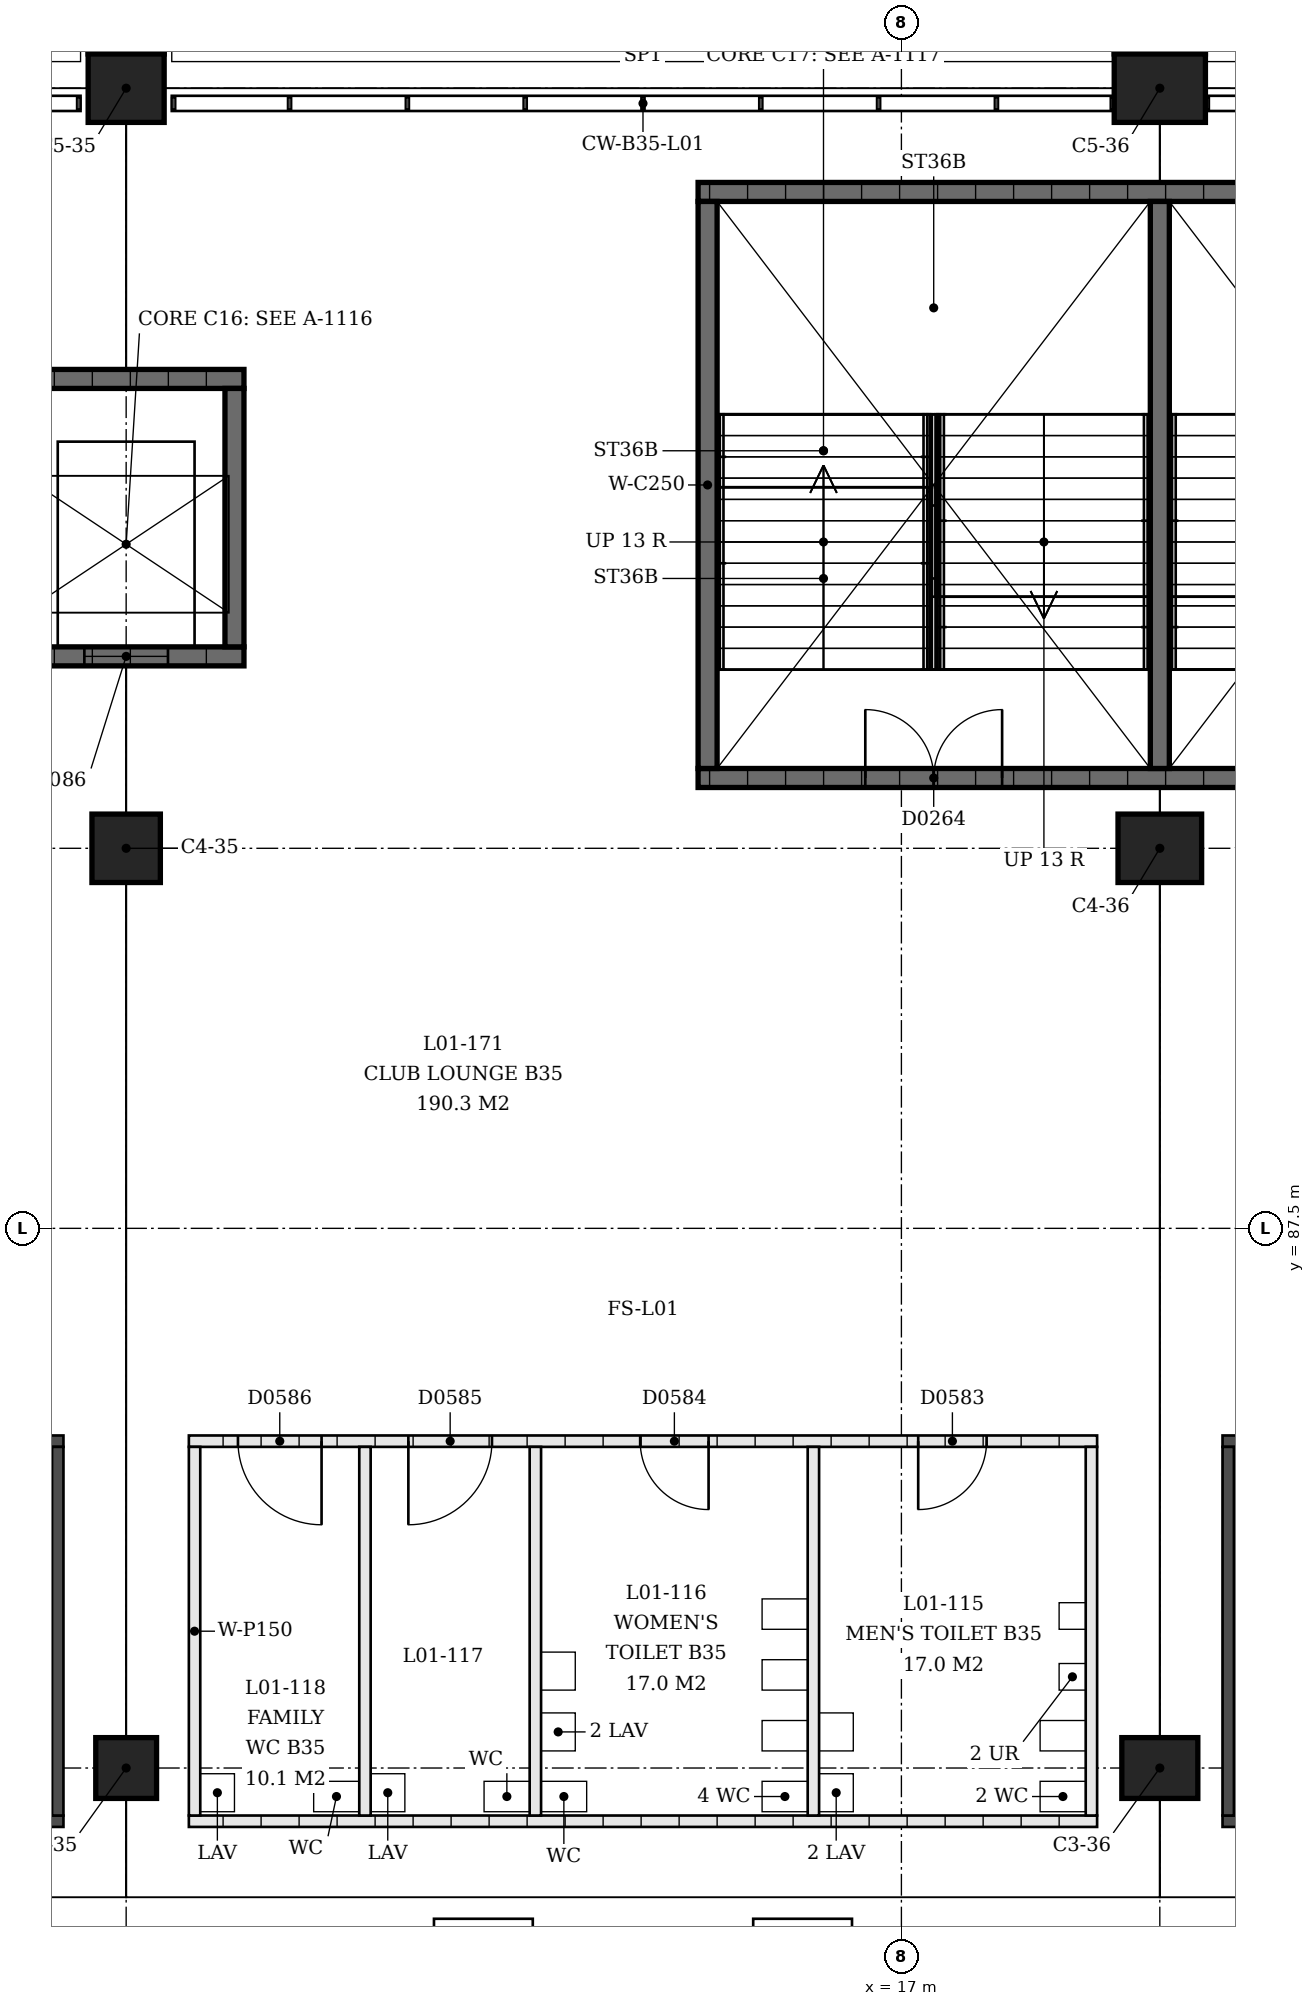
"""IFC4 building model, lengths in metres.
Left out: names, types, materials, properties, quantities, classifications, styles, units other than length and angle.
Written with IfcOpenShell. Run it as: python <this file> out.ifc"""

import sys

from ifc_helpers import new_model, si_unit, direction, frame, frame_2d, origin, origin_2d, place, context, subcontext, project, spatial, rectangle, extrude, element, fill, save


model = new_model("IFC4")
c1 = context("Model", 3, precision=1e-05, world=origin(), true_north=direction((0.0, 1.0)))
c2 = subcontext(c1, "Body", "Model", "MODEL_VIEW")
j1 = project(units=[si_unit("LENGTHUNIT", "METRE"), si_unit("PLANEANGLEUNIT", "RADIAN")], contexts=[c1])
p1 = place(None, origin())
s1 = spatial("IfcSite", under=j1, at=p1, CompositionType="ELEMENT")
p2 = place(p1, origin())
s2 = spatial("IfcBuilding", under=s1, at=p2, CompositionType="ELEMENT")
p3 = place(p2, frame((0.0, 0.0, 4.5)))
s3 = spatial("IfcBuildingStorey", under=s2, at=p3, CompositionType="ELEMENT", Elevation=4.5)
p4 = place(p3, frame((6.8, 80.4, 0.0), z_axis=(0.0, 0.0, 1.0), x_axis=(-1.0, 0.0, 0.0)))
e1 = element("IfcColumn", 1, at=p4, inside=s3, PredefinedType="COLUMN", context=c2, shape_type="SweptSolid", body=[
    extrude(rectangle(XDim=0.8, YDim=0.8, at=origin_2d()), origin(), (0.0, 0.0, 1.0), 4.5),
])
p5 = place(p3, frame((6.8, 92.5, 0.0), z_axis=(0.0, 0.0, 1.0), x_axis=(-1.0, 0.0, 0.0)))
e2 = element("IfcColumn", 2, at=p5, inside=s3, PredefinedType="COLUMN", context=c2, shape_type="SweptSolid", body=[
    extrude(rectangle(XDim=0.9, YDim=0.9, at=origin_2d()), origin(), (0.0, 0.0, 1.0), 4.5),
])
p6 = place(p3, frame((6.8, 102.5, 0.0), z_axis=(0.0, 0.0, 1.0), x_axis=(-1.0, 0.0, 0.0)))
e3 = element("IfcColumn", 3, at=p6, inside=s3, PredefinedType="COLUMN", context=c2, shape_type="SweptSolid", body=[
    extrude(rectangle(XDim=1.0, YDim=0.9, at=origin_2d()), origin(), (0.0, 0.0, 1.0), 4.5),
])
p7 = place(p3, frame((20.4, 80.4, 0.0), z_axis=(0.0, 0.0, 1.0), x_axis=(-1.0, 0.0, 0.0)))
e4 = element("IfcColumn", 4, at=p7, inside=s3, PredefinedType="COLUMN", context=c2, shape_type="SweptSolid", body=[
    extrude(rectangle(XDim=1.0, YDim=0.8, at=origin_2d()), origin(), (0.0, 0.0, 1.0), 4.5),
])
p8 = place(p3, frame((20.4, 92.5, 0.0), z_axis=(0.0, 0.0, 1.0), x_axis=(-1.0, 0.0, 0.0)))
e5 = element("IfcColumn", 5, at=p8, inside=s3, PredefinedType="COLUMN", context=c2, shape_type="SweptSolid", body=[
    extrude(rectangle(XDim=1.1, YDim=0.9, at=origin_2d()), origin(), (0.0, 0.0, 1.0), 4.5),
])
p9 = place(p3, frame((20.4, 102.5, 0.0), z_axis=(0.0, 0.0, 1.0), x_axis=(-1.0, 0.0, 0.0)))
e6 = element("IfcColumn", 6, at=p9, inside=s3, PredefinedType="COLUMN", context=c2, shape_type="SweptSolid", body=[
    extrude(rectangle(XDim=1.2, YDim=0.9, at=origin_2d()), origin(), (0.0, 0.0, 1.0), 4.5),
])
p10 = place(p3, frame((26.475, 93.425, 0.0), z_axis=(0.0, 0.0, 1.0), x_axis=(-1.0, 0.0, 0.0)))
e7 = element("IfcWall", 7, at=p10, inside=s3, PredefinedType="SHEAR", context=c2, shape_type="SweptSolid", body=[
    extrude(rectangle(XDim=12.15, YDim=0.25, at=frame_2d((6.075, 0.0))), origin(), (0.0, 0.0, 1.0), 4.09),
])
p11 = place(p10, frame((2.2, 0.0, 0.0)))
e8 = element("IfcOpeningElement", 8, at=p11, cuts=e7, PredefinedType="OPENING", context=c2, shape_type="SweptSolid", body=[
    extrude(rectangle(XDim=1.8, YDim=2.1, at=frame_2d((0.9, 1.05))), frame((0.0, 0.125, 0.0), z_axis=(0.0, -1.0, 0.0), x_axis=(1.0, 0.0, 0.0)), (0.0, 0.0, 1.0), 0.25),
])
p12 = place(p10, frame((8.15, 0.0, 0.0)))
e9 = element("IfcOpeningElement", 9, at=p12, cuts=e7, PredefinedType="OPENING", context=c2, shape_type="SweptSolid", body=[
    extrude(rectangle(XDim=1.8, YDim=2.1, at=frame_2d((0.9, 1.05))), frame((0.0, 0.125, 0.0), z_axis=(0.0, -1.0, 0.0), x_axis=(1.0, 0.0, 0.0)), (0.0, 0.0, 1.0), 0.25),
])
p13 = place(p3, frame((26.475, 101.135, 0.0), z_axis=(0.0, 0.0, 1.0), x_axis=(-1.0, 0.0, 0.0)))
e10 = element("IfcWall", 10, at=p13, inside=s3, PredefinedType="SHEAR", context=c2, shape_type="SweptSolid", body=[
    extrude(rectangle(XDim=12.15, YDim=0.25, at=frame_2d((6.075, 0.0))), origin(), (0.0, 0.0, 1.0), 4.09),
])
for number, where, z_axis, x_axis in (
    (11, (14.45, 93.55, 0.0), (0.0, 0.0, 1.0), (0.0, 1.0, 0.0)),
    (12, (20.4, 93.55, 0.0), (0.0, 0.0, 1.0), (0.0, 1.0, 0.0)),
):
    element("IfcWall", number, at=place(p3, frame(where, z_axis=z_axis, x_axis=x_axis)), inside=s3, PredefinedType="SHEAR", context=c2, shape_type="SweptSolid", body=[
        extrude(rectangle(XDim=7.46, YDim=0.25, at=frame_2d((3.73, 0.0))), origin(), (0.0, 0.0, 1.0), 4.09),
    ])
p14 = place(p3, frame((8.35, 95.025, 0.0), z_axis=(0.0, 0.0, 1.0), x_axis=(-1.0, 0.0, 0.0)))
e13 = element("IfcWall", 13, at=p14, inside=s3, PredefinedType="SHEAR", context=c2, shape_type="SweptSolid", body=[
    extrude(rectangle(XDim=3.1, YDim=0.25, at=frame_2d((1.55, 0.0))), origin(), (0.0, 0.0, 1.0), 4.09),
])
p15 = place(p14, frame((1.0, 0.0, 0.0)))
e14 = element("IfcOpeningElement", 14, at=p15, cuts=e13, PredefinedType="OPENING", context=c2, shape_type="SweptSolid", body=[
    extrude(rectangle(XDim=1.1, YDim=2.1, at=frame_2d((0.55, 1.05))), frame((0.0, 0.125, 0.0), z_axis=(0.0, -1.0, 0.0), x_axis=(1.0, 0.0, 0.0)), (0.0, 0.0, 1.0), 0.25),
])
p16 = place(p3, frame((8.35, 98.675, 0.0), z_axis=(0.0, 0.0, 1.0), x_axis=(-1.0, 0.0, 0.0)))
e15 = element("IfcWall", 15, at=p16, inside=s3, PredefinedType="SHEAR", context=c2, shape_type="SweptSolid", body=[
    extrude(rectangle(XDim=3.1, YDim=0.25, at=frame_2d((1.55, 0.0))), origin(), (0.0, 0.0, 1.0), 4.09),
])
p17 = place(p3, frame((8.225, 95.15, 0.0), z_axis=(0.0, 0.0, 1.0), x_axis=(0.0, 1.0, 0.0)))
e16 = element("IfcWall", 16, at=p17, inside=s3, PredefinedType="SHEAR", context=c2, shape_type="SweptSolid", body=[
    extrude(rectangle(XDim=3.4, YDim=0.25, at=frame_2d((1.7, 0.0))), origin(), (0.0, 0.0, 1.0), 4.09),
])
p18 = place(p3, frame((-5.975, 79.7, 0.0), z_axis=(0.0, 0.0, 1.0), x_axis=(1.0, 0.0, 0.0)))
e17 = element("IfcWall", 17, at=p18, inside=s3, PredefinedType="SOLIDWALL", context=c2, shape_type="SweptSolid", body=[
    extrude(rectangle(XDim=11.95, YDim=0.15, at=frame_2d((5.975, 0.0))), origin(), (0.0, 0.0, 1.0), 3.0),
])
p19 = place(p3, frame((-5.975, 84.7, 0.0), z_axis=(0.0, 0.0, 1.0), x_axis=(1.0, 0.0, 0.0)))
e18 = element("IfcWall", 18, at=p19, inside=s3, PredefinedType="SOLIDWALL", context=c2, shape_type="SweptSolid", body=[
    extrude(rectangle(XDim=11.95, YDim=0.15, at=frame_2d((5.975, 0.0))), origin(), (0.0, 0.0, 1.0), 3.0),
])
p20 = place(p19, frame((2.525, 0.0, 0.0)))
e19 = element("IfcOpeningElement", 19, at=p20, cuts=e18, PredefinedType="OPENING", context=c2, shape_type="SweptSolid", body=[
    extrude(rectangle(XDim=1.0, YDim=2.1, at=frame_2d((0.5, 1.05))), frame((0.0, 0.075, 0.0), z_axis=(0.0, -1.0, 0.0), x_axis=(1.0, 0.0, 0.0)), (0.0, 0.0, 1.0), 0.15),
])
p21 = place(p19, frame((8.425, 0.0, 0.0)))
e20 = element("IfcOpeningElement", 20, at=p21, cuts=e18, PredefinedType="OPENING", context=c2, shape_type="SweptSolid", body=[
    extrude(rectangle(XDim=1.0, YDim=2.1, at=frame_2d((0.5, 1.05))), frame((0.0, 0.075, 0.0), z_axis=(0.0, -1.0, 0.0), x_axis=(1.0, 0.0, 0.0)), (0.0, 0.0, 1.0), 0.15),
])
p22 = place(p3, frame((5.9, 79.775, 0.0), z_axis=(0.0, 0.0, 1.0), x_axis=(0.0, 1.0, 0.0)))
e21 = element("IfcWall", 21, at=p22, inside=s3, PredefinedType="SOLIDWALL", context=c2, shape_type="SweptSolid", body=[
    extrude(rectangle(XDim=4.85, YDim=0.15, at=frame_2d((2.425, 0.0))), origin(), (0.0, 0.0, 1.0), 3.0),
])
p23 = place(p3, frame((19.575, 79.7, 0.0), z_axis=(0.0, 0.0, 1.0), x_axis=(-1.0, 0.0, 0.0)))
e22 = element("IfcWall", 22, at=p23, inside=s3, PredefinedType="PARTITIONING", context=c2, shape_type="SweptSolid", body=[
    extrude(rectangle(XDim=11.95, YDim=0.15, at=frame_2d((5.975, 0.0))), origin(), (0.0, 0.0, 1.0), 3.0),
])
p24 = place(p3, frame((19.575, 84.7, 0.0), z_axis=(0.0, 0.0, 1.0), x_axis=(-1.0, 0.0, 0.0)))
e23 = element("IfcWall", 23, at=p24, inside=s3, PredefinedType="PARTITIONING", context=c2, shape_type="SweptSolid", body=[
    extrude(rectangle(XDim=11.95, YDim=0.15, at=frame_2d((5.975, 0.0))), origin(), (0.0, 0.0, 1.0), 3.0),
])
p25 = place(p24, frame((1.454, 0.0, 0.0)))
e24 = element("IfcOpeningElement", 24, at=p25, cuts=e23, PredefinedType="OPENING", context=c2, shape_type="SweptSolid", body=[
    extrude(rectangle(XDim=0.9, YDim=2.1, at=frame_2d((0.45, 1.05))), frame((0.0, 0.075, 0.0), z_axis=(0.0, -1.0, 0.0), x_axis=(1.0, 0.0, 0.0)), (0.0, 0.0, 1.0), 0.15),
])
p26 = place(p24, frame((5.112, 0.0, 0.0)))
e25 = element("IfcOpeningElement", 25, at=p26, cuts=e23, PredefinedType="OPENING", context=c2, shape_type="SweptSolid", body=[
    extrude(rectangle(XDim=0.9, YDim=2.1, at=frame_2d((0.45, 1.05))), frame((0.0, 0.075, 0.0), z_axis=(0.0, -1.0, 0.0), x_axis=(1.0, 0.0, 0.0)), (0.0, 0.0, 1.0), 0.15),
])
p27 = place(p24, frame((7.962, 0.0, 0.0)))
e26 = element("IfcOpeningElement", 26, at=p27, cuts=e23, PredefinedType="OPENING", context=c2, shape_type="SweptSolid", body=[
    extrude(rectangle(XDim=1.1, YDim=2.1, at=frame_2d((0.55, 1.05))), frame((0.0, 0.075, 0.0), z_axis=(0.0, -1.0, 0.0), x_axis=(1.0, 0.0, 0.0)), (0.0, 0.0, 1.0), 0.15),
])
p28 = place(p24, frame((10.204, 0.0, 0.0)))
e27 = element("IfcOpeningElement", 27, at=p28, cuts=e23, PredefinedType="OPENING", context=c2, shape_type="SweptSolid", body=[
    extrude(rectangle(XDim=1.1, YDim=2.1, at=frame_2d((0.55, 1.05))), frame((0.0, 0.075, 0.0), z_axis=(0.0, -1.0, 0.0), x_axis=(1.0, 0.0, 0.0)), (0.0, 0.0, 1.0), 0.15),
])
for number, where, z_axis, x_axis in (
    (28, (19.5, 79.775, 0.0), (0.0, 0.0, 1.0), (0.0, 1.0, 0.0)),
    (29, (15.842, 79.775, 0.0), (0.0, 0.0, 1.0), (0.0, 1.0, 0.0)),
    (30, (12.184, 79.775, 0.0), (0.0, 0.0, 1.0), (0.0, 1.0, 0.0)),
    (31, (9.942, 79.775, 0.0), (0.0, 0.0, 1.0), (0.0, 1.0, 0.0)),
    (32, (7.7, 79.775, 0.0), (0.0, 0.0, 1.0), (0.0, 1.0, 0.0)),
):
    element("IfcWall", number, at=place(p3, frame(where, z_axis=z_axis, x_axis=x_axis)), inside=s3, PredefinedType="PARTITIONING", context=c2, shape_type="SweptSolid", body=[
        extrude(rectangle(XDim=4.85, YDim=0.15, at=frame_2d((2.425, 0.0))), origin(), (0.0, 0.0, 1.0), 3.0),
    ])
p29 = place(p3, frame((21.225, 79.7, 0.0), z_axis=(0.0, 0.0, 1.0), x_axis=(1.0, 0.0, 0.0)))
e33 = element("IfcWall", 33, at=p29, inside=s3, PredefinedType="SOLIDWALL", context=c2, shape_type="SweptSolid", body=[
    extrude(rectangle(XDim=11.95, YDim=0.15, at=frame_2d((5.975, 0.0))), origin(), (0.0, 0.0, 1.0), 3.0),
])
p30 = place(p3, frame((21.225, 84.7, 0.0), z_axis=(0.0, 0.0, 1.0), x_axis=(1.0, 0.0, 0.0)))
e34 = element("IfcWall", 34, at=p30, inside=s3, PredefinedType="SOLIDWALL", context=c2, shape_type="SweptSolid", body=[
    extrude(rectangle(XDim=11.95, YDim=0.15, at=frame_2d((5.975, 0.0))), origin(), (0.0, 0.0, 1.0), 3.0),
])
p31 = place(p30, frame((2.525, 0.0, 0.0)))
e35 = element("IfcOpeningElement", 35, at=p31, cuts=e34, PredefinedType="OPENING", context=c2, shape_type="SweptSolid", body=[
    extrude(rectangle(XDim=1.0, YDim=2.1, at=frame_2d((0.5, 1.05))), frame((0.0, 0.075, 0.0), z_axis=(0.0, -1.0, 0.0), x_axis=(1.0, 0.0, 0.0)), (0.0, 0.0, 1.0), 0.15),
])
p32 = place(p30, frame((8.425, 0.0, 0.0)))
e36 = element("IfcOpeningElement", 36, at=p32, cuts=e34, PredefinedType="OPENING", context=c2, shape_type="SweptSolid", body=[
    extrude(rectangle(XDim=1.0, YDim=2.1, at=frame_2d((0.5, 1.05))), frame((0.0, 0.075, 0.0), z_axis=(0.0, -1.0, 0.0), x_axis=(1.0, 0.0, 0.0)), (0.0, 0.0, 1.0), 0.15),
])
p33 = place(p3, frame((21.3, 79.775, 0.0), z_axis=(0.0, 0.0, 1.0), x_axis=(0.0, 1.0, 0.0)))
e37 = element("IfcWall", 37, at=p33, inside=s3, PredefinedType="SOLIDWALL", context=c2, shape_type="SweptSolid", body=[
    extrude(rectangle(XDim=4.85, YDim=0.15, at=frame_2d((2.425, 0.0))), origin(), (0.0, 0.0, 1.0), 3.0),
])
p34 = place(p12, origin())
e38 = element("IfcDoor", 38, at=p34, inside=s3, OperationType="DOUBLE_DOOR_SINGLE_SWING", PredefinedType="DOOR", context=c2, shape_type="SweptSolid", body=[
    extrude(rectangle(XDim=1.8, YDim=2.1, at=frame_2d((0.9, 1.05))), frame((0.0, 0.025, 0.0), z_axis=(0.0, -1.0, 0.0), x_axis=(1.0, 0.0, 0.0)), (0.0, 0.0, 1.0), 0.05),
])
fill(e9, e38)
p35 = place(p15, origin())
e39 = element("IfcDoor", 39, at=p35, inside=s3, OperationType="SLIDING_TO_LEFT", PredefinedType="DOOR", context=c2, shape_type="SweptSolid", body=[
    extrude(rectangle(XDim=1.1, YDim=2.1, at=frame_2d((0.55, 1.05))), frame((0.0, 0.025, 0.0), z_axis=(0.0, -1.0, 0.0), x_axis=(1.0, 0.0, 0.0)), (0.0, 0.0, 1.0), 0.05),
])
fill(e14, e39)
p36 = place(p25, origin())
e40 = element("IfcDoor", 40, at=p36, inside=s3, OperationType="SINGLE_SWING_LEFT", PredefinedType="DOOR", context=c2, shape_type="SweptSolid", body=[
    extrude(rectangle(XDim=0.9, YDim=2.1, at=frame_2d((0.45, 1.05))), frame((0.0, 0.025, 0.0), z_axis=(0.0, -1.0, 0.0), x_axis=(1.0, 0.0, 0.0)), (0.0, 0.0, 1.0), 0.05),
])
fill(e24, e40)
p37 = place(p26, origin())
e41 = element("IfcDoor", 41, at=p37, inside=s3, OperationType="SINGLE_SWING_RIGHT", PredefinedType="DOOR", context=c2, shape_type="SweptSolid", body=[
    extrude(rectangle(XDim=0.9, YDim=2.1, at=frame_2d((0.45, 1.05))), frame((0.0, 0.025, 0.0), z_axis=(0.0, -1.0, 0.0), x_axis=(1.0, 0.0, 0.0)), (0.0, 0.0, 1.0), 0.05),
])
fill(e25, e41)
p38 = place(p27, origin())
e42 = element("IfcDoor", 42, at=p38, inside=s3, OperationType="SINGLE_SWING_LEFT", PredefinedType="DOOR", context=c2, shape_type="SweptSolid", body=[
    extrude(rectangle(XDim=1.1, YDim=2.1, at=frame_2d((0.55, 1.05))), frame((0.0, 0.025, 0.0), z_axis=(0.0, -1.0, 0.0), x_axis=(1.0, 0.0, 0.0)), (0.0, 0.0, 1.0), 0.05),
])
fill(e26, e42)
p39 = place(p28, origin())
e43 = element("IfcDoor", 43, at=p39, inside=s3, OperationType="SINGLE_SWING_RIGHT", PredefinedType="DOOR", context=c2, shape_type="SweptSolid", body=[
    extrude(rectangle(XDim=1.1, YDim=2.1, at=frame_2d((0.55, 1.05))), frame((0.0, 0.025, 0.0), z_axis=(0.0, -1.0, 0.0), x_axis=(1.0, 0.0, 0.0)), (0.0, 0.0, 1.0), 0.05),
])
fill(e27, e43)
save(model, sys.argv[1])
